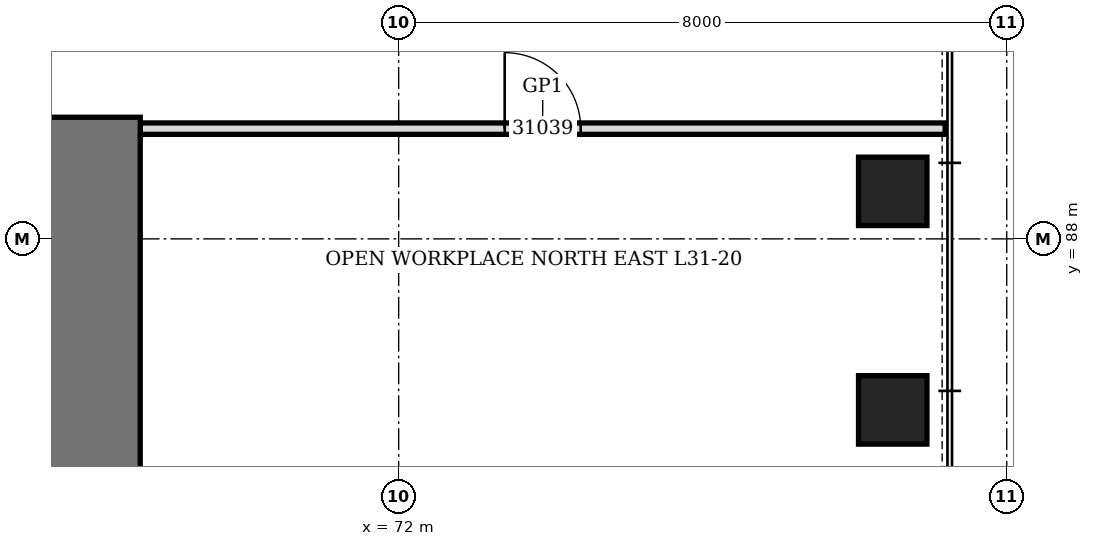
"""IFC4 building model, lengths in metres.
Left out: names, types, materials, properties, quantities, classifications, styles, units other than length and angle.
Written with IfcOpenShell. Run it as: python <this file> out.ifc"""

import sys

from ifc_helpers import new_model, si_unit, direction, frame, frame_2d, origin, origin_2d, place, context, subcontext, project, spatial, rectangle, hollow_rectangle, extrude, element, fill, save


model = new_model("IFC4")
c1 = context("Model", 3, precision=1e-05, world=origin(), true_north=direction((0.0, 1.0)))
c2 = subcontext(c1, "Body", "Model", "MODEL_VIEW")
j1 = project(units=[si_unit("LENGTHUNIT", "METRE"), si_unit("PLANEANGLEUNIT", "RADIAN")], contexts=[c1])
p1 = place(None, origin())
s1 = spatial("IfcSite", under=j1, at=p1, CompositionType="ELEMENT")
p2 = place(p1, origin())
s2 = spatial("IfcBuilding", under=s1, at=p2, CompositionType="ELEMENT")
p3 = place(p2, frame((0.0, 0.0, 141.7)))
s3 = spatial("IfcBuildingStorey", under=s2, at=p3, CompositionType="ELEMENT", Elevation=141.7)
for number, where, z_axis, x_axis in (
    (1, (78.5, 85.75, 0.0), (0.0, 0.0, 1.0), (0.0, 1.0, 0.0)),
    (2, (78.5, 88.625, 0.0), (0.0, 0.0, 1.0), (0.0, 1.0, 0.0)),
):
    element("IfcColumn", number, at=place(p3, frame(where, z_axis=z_axis, x_axis=x_axis)), inside=s3, PredefinedType="COLUMN", context=c2, shape_type="SweptSolid", body=[
        extrude(hollow_rectangle(XDim=0.9, YDim=0.9, WallThickness=0.12, at=origin_2d()), origin(), (0.0, 0.0, 1.0), 4.2),
    ])
p4 = place(p3, frame((68.0, 70.4, 0.0), z_axis=(0.0, 0.0, 1.0), x_axis=(0.0, 1.0, 0.0)))
e3 = element("IfcWall", 3, at=p4, inside=s3, PredefinedType="SHEAR", context=c2, shape_type="SweptSolid", body=[
    extrude(rectangle(XDim=19.2, YDim=1.2, at=frame_2d((9.6, 0.0))), origin(), (0.0, 0.0, 1.0), 4.2),
])
p5 = place(p4, frame((8.6, 0.0, 0.0)))
e4 = element("IfcOpeningElement", 4, at=p5, cuts=e3, PredefinedType="OPENING", context=c2, shape_type="SweptSolid", body=[
    extrude(rectangle(XDim=2.0, YDim=2.4, at=frame_2d((1.0, 1.2))), frame((0.0, 0.61, 0.0), z_axis=(0.0, -1.0, 0.0), x_axis=(1.0, 0.0, 0.0)), (0.0, 0.0, 1.0), 1.22),
])
p6 = place(p3, frame((68.6, 89.45, 0.0), z_axis=(0.0, 0.0, 1.0), x_axis=(1.0, 0.0, 0.0)))
e5 = element("IfcWall", 5, at=p6, inside=s3, PredefinedType="PARTITIONING", context=c2, shape_type="SweptSolid", body=[
    extrude(rectangle(XDim=10.59, YDim=0.15, at=frame_2d((5.295, 0.0))), origin(), (0.0, 0.0, 1.0), 4.04),
])
p7 = place(p6, frame((4.795, 0.0, 0.0)))
e6 = element("IfcOpeningElement", 6, at=p7, cuts=e5, PredefinedType="OPENING", context=c2, shape_type="SweptSolid", body=[
    extrude(rectangle(XDim=1.0, YDim=2.4, at=frame_2d((0.5, 1.2))), frame((0.0, 0.085, 0.0), z_axis=(0.0, -1.0, 0.0), x_axis=(1.0, 0.0, 0.0)), (0.0, 0.0, 1.0), 0.17),
])
p8 = place(p7, origin())
e7 = element("IfcDoor", 7, at=p8, inside=s3, OperationType="SINGLE_SWING_RIGHT", PredefinedType="DOOR", context=c2, shape_type="SweptSolid", body=[
    extrude(rectangle(XDim=1.0, YDim=2.4, at=frame_2d((0.5, 1.2))), frame((0.0, 0.075, 0.0), z_axis=(0.0, -1.0, 0.0), x_axis=(1.0, 0.0, 0.0)), (0.0, 0.0, 1.0), 0.149),
])
fill(e6, e7)
save(model, sys.argv[1])
